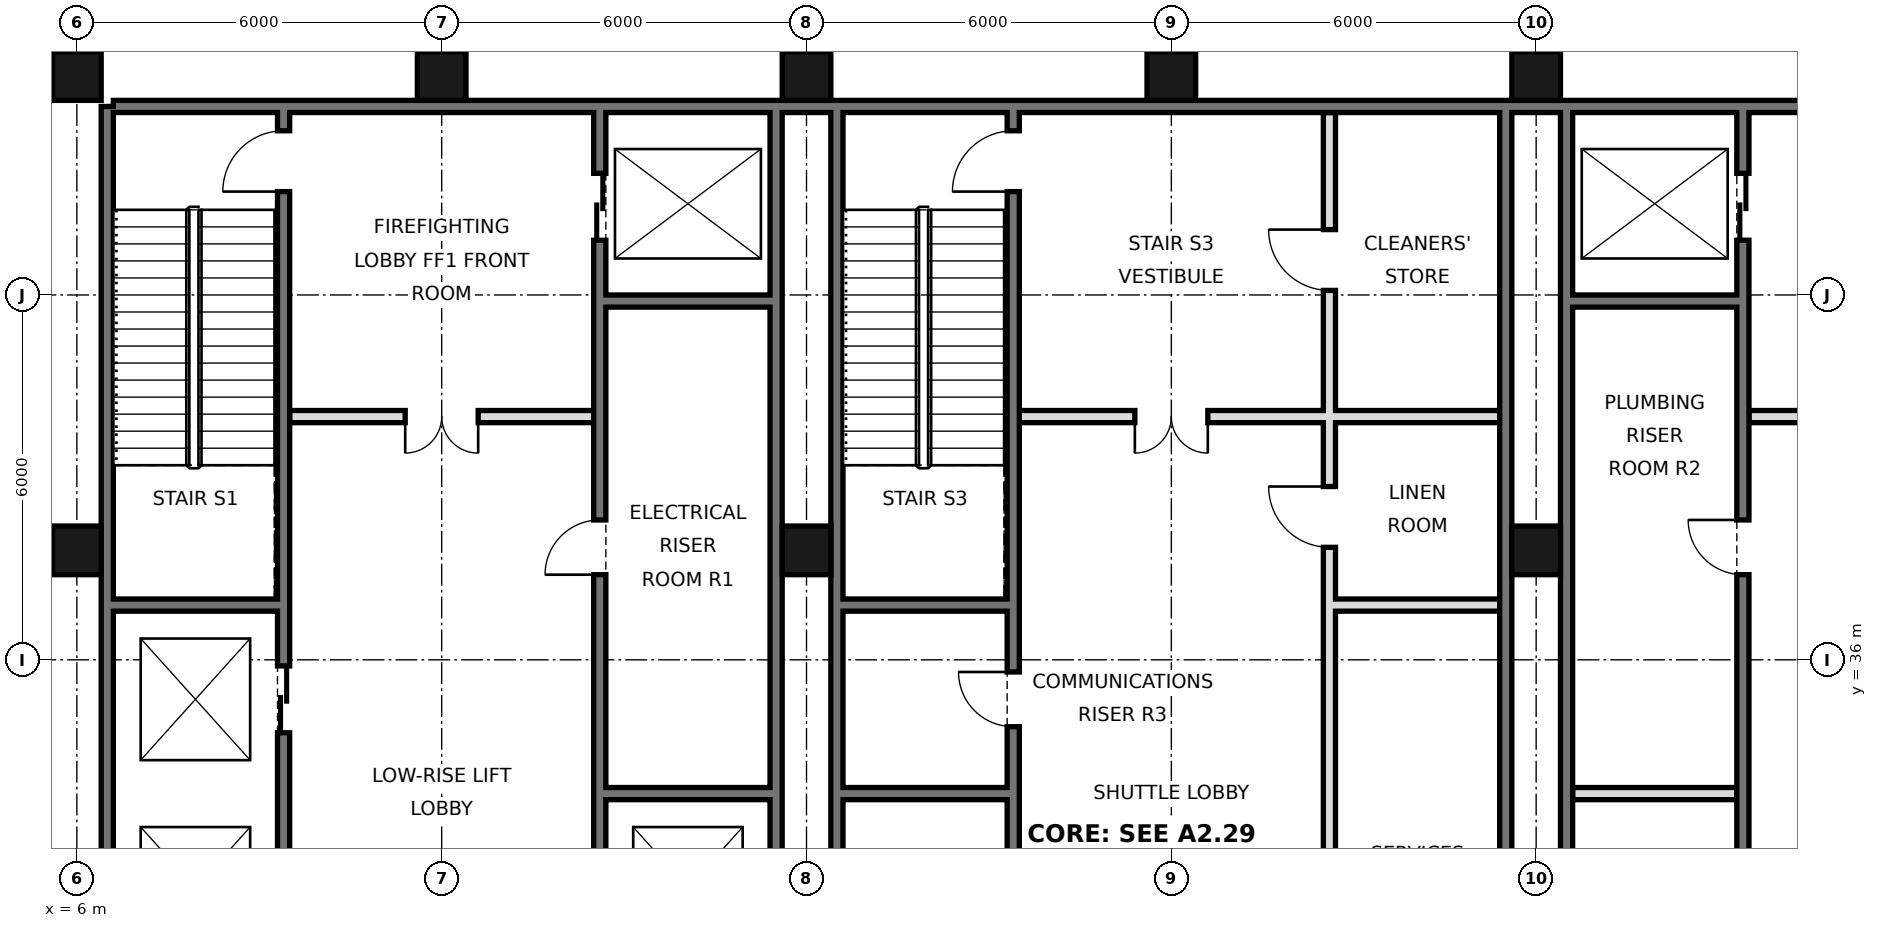
"""IFC4 building model, lengths in metres.
Left out: names, types, materials, properties, quantities, classifications, styles, units other than length and angle.
Written with IfcOpenShell. Run it as: python <this file> out.ifc"""

import sys

from ifc_helpers import new_model, si_unit, direction, frame, frame_2d, origin, origin_2d, place, context, subcontext, project, spatial, rectangle, hollow_rectangle, extrude, element, fill, save


model = new_model("IFC4")
c1 = context("Model", 3, precision=1e-05, world=origin(), true_north=direction((0.0, 1.0)))
c2 = subcontext(c1, "Body", "Model", "MODEL_VIEW")
j1 = project(units=[si_unit("LENGTHUNIT", "METRE"), si_unit("PLANEANGLEUNIT", "RADIAN")], contexts=[c1])
p1 = place(None, origin())
s1 = spatial("IfcSite", under=j1, at=p1, CompositionType="ELEMENT")
p2 = place(p1, origin())
s2 = spatial("IfcBuilding", under=s1, at=p2, CompositionType="ELEMENT")
p3 = place(p2, frame((0.0, 0.0, 114.2)))
s3 = spatial("IfcBuildingStorey", under=s2, at=p3, CompositionType="ELEMENT", Elevation=114.2)
for number, where, z_axis, x_axis in (
    (1, (6.0, 37.8, 0.0), (0.0, 0.0, 1.0), (1.0, 0.0, 0.0)),
    (2, (6.0, 45.6, 0.0), (0.0, 0.0, 1.0), (1.0, 0.0, 0.0)),
    (3, (12.0, 45.6, 0.0), (0.0, 0.0, 1.0), (1.0, 0.0, 0.0)),
    (4, (18.0, 37.8, 0.0), (0.0, 0.0, 1.0), (1.0, 0.0, 0.0)),
    (5, (18.0, 45.6, 0.0), (0.0, 0.0, 1.0), (1.0, 0.0, 0.0)),
    (6, (24.0, 45.6, 0.0), (0.0, 0.0, 1.0), (1.0, 0.0, 0.0)),
    (7, (30.0, 37.8, 0.0), (0.0, 0.0, 1.0), (1.0, 0.0, 0.0)),
    (8, (30.0, 45.6, 0.0), (0.0, 0.0, 1.0), (1.0, 0.0, 0.0)),
):
    element("IfcColumn", number, at=place(p3, frame(where, z_axis=z_axis, x_axis=x_axis)), inside=s3, PredefinedType="COLUMN", context=c2, shape_type="SweptSolid", body=[
        extrude(hollow_rectangle(XDim=0.8, YDim=0.8, WallThickness=0.05, at=origin_2d()), origin(), (0.0, 0.0, 1.0), 5.4),
    ])
p4 = place(p3, frame((6.5, 21.6, 0.0), z_axis=(0.0, 0.0, 1.0), x_axis=(0.0, 1.0, 0.0)))
e9 = element("IfcWall", 9, at=p4, inside=s3, PredefinedType="SOLIDWALL", context=c2, shape_type="SweptSolid", body=[
    extrude(rectangle(XDim=23.5, YDim=0.2, at=frame_2d((11.75, 0.0))), origin(), (0.0, 0.0, 1.0), 5.22),
])
p5 = place(p3, frame((6.6, 45.1, 0.0), z_axis=(0.0, 0.0, 1.0), x_axis=(1.0, 0.0, 0.0)))
e10 = element("IfcWall", 10, at=p5, inside=s3, PredefinedType="SOLIDWALL", context=c2, shape_type="SweptSolid", body=[
    extrude(rectangle(XDim=34.8, YDim=0.2, at=frame_2d((17.4, 0.0))), origin(), (0.0, 0.0, 1.0), 5.22),
])
for number, where, z_axis, x_axis in (
    (11, (17.5, 27.6, 0.0), (0.0, 0.0, 1.0), (0.0, 1.0, 0.0)),
    (12, (18.5, 27.6, 0.0), (0.0, 0.0, 1.0), (0.0, 1.0, 0.0)),
    (13, (29.5, 27.6, 0.0), (0.0, 0.0, 1.0), (0.0, 1.0, 0.0)),
    (14, (30.5, 27.6, 0.0), (0.0, 0.0, 1.0), (0.0, 1.0, 0.0)),
):
    element("IfcWall", number, at=place(p3, frame(where, z_axis=z_axis, x_axis=x_axis)), inside=s3, PredefinedType="SOLIDWALL", context=c2, shape_type="SweptSolid", body=[
        extrude(rectangle(XDim=17.5, YDim=0.2, at=frame_2d((8.75, 0.0))), origin(), (0.0, 0.0, 1.0), 5.22),
    ])
p6 = place(p3, frame((14.6, 27.5, 0.0), z_axis=(0.0, 0.0, 1.0), x_axis=(0.0, 1.0, 0.0)))
e15 = element("IfcWall", 15, at=p6, inside=s3, PredefinedType="SOLIDWALL", context=c2, shape_type="SweptSolid", body=[
    extrude(rectangle(XDim=17.5, YDim=0.2, at=frame_2d((8.75, 0.0))), origin(), (0.0, 0.0, 1.0), 5.22),
])
p7 = place(p6, frame((1.1, 0.0, 0.0)))
e16 = element("IfcOpeningElement", 16, at=p7, cuts=e15, PredefinedType="OPENING", context=c2, shape_type="SweptSolid", body=[
    extrude(rectangle(XDim=1.1, YDim=2.1, at=frame_2d((0.55, 1.05))), frame((0.0, 0.11, 0.0), z_axis=(0.0, -1.0, 0.0), x_axis=(1.0, 0.0, 0.0)), (0.0, 0.0, 1.0), 0.22),
])
p8 = place(p6, frame((4.2, 0.0, 0.0)))
e17 = element("IfcOpeningElement", 17, at=p8, cuts=e15, PredefinedType="OPENING", context=c2, shape_type="SweptSolid", body=[
    extrude(rectangle(XDim=1.1, YDim=2.1, at=frame_2d((0.55, 1.05))), frame((0.0, 0.11, 0.0), z_axis=(0.0, -1.0, 0.0), x_axis=(1.0, 0.0, 0.0)), (0.0, 0.0, 1.0), 0.22),
])
p9 = place(p6, frame((15.4, 0.0, 0.0)))
e18 = element("IfcOpeningElement", 18, at=p9, cuts=e15, PredefinedType="OPENING", context=c2, shape_type="SweptSolid", body=[
    extrude(rectangle(XDim=1.1, YDim=2.1, at=frame_2d((0.55, 1.05))), frame((0.0, 0.11, 0.0), z_axis=(0.0, -1.0, 0.0), x_axis=(1.0, 0.0, 0.0)), (0.0, 0.0, 1.0), 0.22),
])
p10 = place(p6, frame((9.9, 0.0, 0.0)))
e19 = element("IfcOpeningElement", 19, at=p10, cuts=e15, PredefinedType="OPENING", context=c2, shape_type="SweptSolid", body=[
    extrude(rectangle(XDim=0.9, YDim=2.1, at=frame_2d((0.45, 1.05))), frame((0.0, 0.11, 0.0), z_axis=(0.0, -1.0, 0.0), x_axis=(1.0, 0.0, 0.0)), (0.0, 0.0, 1.0), 0.22),
])
p11 = place(p3, frame((21.4, 27.5, 0.0), z_axis=(0.0, 0.0, 1.0), x_axis=(0.0, 1.0, 0.0)))
e20 = element("IfcWall", 20, at=p11, inside=s3, PredefinedType="SOLIDWALL", context=c2, shape_type="SweptSolid", body=[
    extrude(rectangle(XDim=17.5, YDim=0.2, at=frame_2d((8.75, 0.0))), origin(), (0.0, 0.0, 1.0), 5.22),
])
p12 = place(p11, frame((16.2, 0.0, 0.0)))
e21 = element("IfcOpeningElement", 21, at=p12, cuts=e20, PredefinedType="OPENING", context=c2, shape_type="SweptSolid", body=[
    extrude(rectangle(XDim=1.0, YDim=2.1, at=frame_2d((0.5, 1.05))), frame((0.0, 0.11, 0.0), z_axis=(0.0, -1.0, 0.0), x_axis=(1.0, 0.0, 0.0)), (0.0, 0.0, 1.0), 0.22),
])
p13 = place(p11, frame((7.4, 0.0, 0.0)))
e22 = element("IfcOpeningElement", 22, at=p13, cuts=e20, PredefinedType="OPENING", context=c2, shape_type="SweptSolid", body=[
    extrude(rectangle(XDim=0.9, YDim=2.1, at=frame_2d((0.45, 1.05))), frame((0.0, 0.11, 0.0), z_axis=(0.0, -1.0, 0.0), x_axis=(1.0, 0.0, 0.0)), (0.0, 0.0, 1.0), 0.22),
])
p14 = place(p3, frame((26.6, 27.5, 0.0), z_axis=(0.0, 0.0, 1.0), x_axis=(0.0, 1.0, 0.0)))
e23 = element("IfcWall", 23, at=p14, inside=s3, PredefinedType="SOLIDWALL", context=c2, shape_type="SweptSolid", body=[
    extrude(rectangle(XDim=17.5, YDim=0.2, at=frame_2d((8.75, 0.0))), origin(), (0.0, 0.0, 1.0), 5.22),
])
p15 = place(p14, frame((4.3, 0.0, 0.0)))
e24 = element("IfcOpeningElement", 24, at=p15, cuts=e23, PredefinedType="OPENING", context=c2, shape_type="SweptSolid", body=[
    extrude(rectangle(XDim=0.9, YDim=2.1, at=frame_2d((0.45, 1.05))), frame((0.0, 0.11, 0.0), z_axis=(0.0, -1.0, 0.0), x_axis=(1.0, 0.0, 0.0)), (0.0, 0.0, 1.0), 0.22),
])
p16 = place(p14, frame((10.35, 0.0, 0.0)))
e25 = element("IfcOpeningElement", 25, at=p16, cuts=e23, PredefinedType="OPENING", context=c2, shape_type="SweptSolid", body=[
    extrude(rectangle(XDim=1.0, YDim=2.1, at=frame_2d((0.5, 1.05))), frame((0.0, 0.11, 0.0), z_axis=(0.0, -1.0, 0.0), x_axis=(1.0, 0.0, 0.0)), (0.0, 0.0, 1.0), 0.22),
])
p17 = place(p14, frame((14.575, 0.0, 0.0)))
e26 = element("IfcOpeningElement", 26, at=p17, cuts=e23, PredefinedType="OPENING", context=c2, shape_type="SweptSolid", body=[
    extrude(rectangle(XDim=1.0, YDim=2.1, at=frame_2d((0.5, 1.05))), frame((0.0, 0.11, 0.0), z_axis=(0.0, -1.0, 0.0), x_axis=(1.0, 0.0, 0.0)), (0.0, 0.0, 1.0), 0.22),
])
p18 = place(p3, frame((33.4, 27.5, 0.0), z_axis=(0.0, 0.0, 1.0), x_axis=(0.0, 1.0, 0.0)))
e27 = element("IfcWall", 27, at=p18, inside=s3, PredefinedType="SOLIDWALL", context=c2, shape_type="SweptSolid", body=[
    extrude(rectangle(XDim=17.5, YDim=0.2, at=frame_2d((8.75, 0.0))), origin(), (0.0, 0.0, 1.0), 5.22),
])
p19 = place(p18, frame((15.4, 0.0, 0.0)))
e28 = element("IfcOpeningElement", 28, at=p19, cuts=e27, PredefinedType="OPENING", context=c2, shape_type="SweptSolid", body=[
    extrude(rectangle(XDim=1.1, YDim=2.1, at=frame_2d((0.55, 1.05))), frame((0.0, 0.11, 0.0), z_axis=(0.0, -1.0, 0.0), x_axis=(1.0, 0.0, 0.0)), (0.0, 0.0, 1.0), 0.22),
])
p20 = place(p18, frame((2.7, 0.0, 0.0)))
e29 = element("IfcOpeningElement", 29, at=p20, cuts=e27, PredefinedType="OPENING", context=c2, shape_type="SweptSolid", body=[
    extrude(rectangle(XDim=1.0, YDim=2.1, at=frame_2d((0.5, 1.05))), frame((0.0, 0.11, 0.0), z_axis=(0.0, -1.0, 0.0), x_axis=(1.0, 0.0, 0.0)), (0.0, 0.0, 1.0), 0.22),
])
p21 = place(p18, frame((9.9, 0.0, 0.0)))
e30 = element("IfcOpeningElement", 30, at=p21, cuts=e27, PredefinedType="OPENING", context=c2, shape_type="SweptSolid", body=[
    extrude(rectangle(XDim=0.9, YDim=2.1, at=frame_2d((0.45, 1.05))), frame((0.0, 0.11, 0.0), z_axis=(0.0, -1.0, 0.0), x_axis=(1.0, 0.0, 0.0)), (0.0, 0.0, 1.0), 0.22),
])
p22 = place(p3, frame((9.4, 21.6, 0.0), z_axis=(0.0, 0.0, 1.0), x_axis=(0.0, 1.0, 0.0)))
e31 = element("IfcWall", 31, at=p22, inside=s3, PredefinedType="SOLIDWALL", context=c2, shape_type="SweptSolid", body=[
    extrude(rectangle(XDim=23.4, YDim=0.2, at=frame_2d((11.7, 0.0))), origin(), (0.0, 0.0, 1.0), 5.22),
])
p23 = place(p22, frame((7.0, 0.0, 0.0)))
e32 = element("IfcOpeningElement", 32, at=p23, cuts=e31, PredefinedType="OPENING", context=c2, shape_type="SweptSolid", body=[
    extrude(rectangle(XDim=1.1, YDim=2.1, at=frame_2d((0.55, 1.05))), frame((0.0, 0.11, 0.0), z_axis=(0.0, -1.0, 0.0), x_axis=(1.0, 0.0, 0.0)), (0.0, 0.0, 1.0), 0.22),
])
p24 = place(p22, frame((10.1, 0.0, 0.0)))
e33 = element("IfcOpeningElement", 33, at=p24, cuts=e31, PredefinedType="OPENING", context=c2, shape_type="SweptSolid", body=[
    extrude(rectangle(XDim=1.1, YDim=2.1, at=frame_2d((0.55, 1.05))), frame((0.0, 0.11, 0.0), z_axis=(0.0, -1.0, 0.0), x_axis=(1.0, 0.0, 0.0)), (0.0, 0.0, 1.0), 0.22),
])
p25 = place(p22, frame((13.2, 0.0, 0.0)))
e34 = element("IfcOpeningElement", 34, at=p25, cuts=e31, PredefinedType="OPENING", context=c2, shape_type="SweptSolid", body=[
    extrude(rectangle(XDim=1.1, YDim=2.1, at=frame_2d((0.55, 1.05))), frame((0.0, 0.11, 0.0), z_axis=(0.0, -1.0, 0.0), x_axis=(1.0, 0.0, 0.0)), (0.0, 0.0, 1.0), 0.22),
])
p26 = place(p22, frame((22.1, 0.0, 0.0)))
e35 = element("IfcOpeningElement", 35, at=p26, cuts=e31, PredefinedType="OPENING", context=c2, shape_type="SweptSolid", body=[
    extrude(rectangle(XDim=1.0, YDim=2.1, at=frame_2d((0.5, 1.05))), frame((0.0, 0.11, 0.0), z_axis=(0.0, -1.0, 0.0), x_axis=(1.0, 0.0, 0.0)), (0.0, 0.0, 1.0), 0.22),
])
p27 = place(p22, frame((0.175, 0.0, 0.0)))
e36 = element("IfcOpeningElement", 36, at=p27, cuts=e31, PredefinedType="OPENING", context=c2, shape_type="SweptSolid", body=[
    extrude(rectangle(XDim=0.9, YDim=2.1, at=frame_2d((0.45, 1.05))), frame((0.0, 0.11, 0.0), z_axis=(0.0, -1.0, 0.0), x_axis=(1.0, 0.0, 0.0)), (0.0, 0.0, 1.0), 0.22),
])
for number, where, z_axis, x_axis in (
    (37, (14.7, 33.8, 0.0), (0.0, 0.0, 1.0), (1.0, 0.0, 0.0)),
    (38, (18.6, 33.8, 0.0), (0.0, 0.0, 1.0), (1.0, 0.0, 0.0)),
    (39, (30.6, 33.8, 0.0), (0.0, 0.0, 1.0), (1.0, 0.0, 0.0)),
    (40, (18.6, 36.9, 0.0), (0.0, 0.0, 1.0), (1.0, 0.0, 0.0)),
    (41, (26.7, 36.9, 0.0), (0.0, 0.0, 1.0), (1.0, 0.0, 0.0)),
    (42, (6.6, 36.9, 0.0), (0.0, 0.0, 1.0), (1.0, 0.0, 0.0)),
):
    element("IfcWall", number, at=place(p3, frame(where, z_axis=z_axis, x_axis=x_axis)), inside=s3, PredefinedType="SOLIDWALL", context=c2, shape_type="SweptSolid", body=[
        extrude(rectangle(XDim=2.7, YDim=0.2, at=frame_2d((1.35, 0.0))), origin(), (0.0, 0.0, 1.0), 5.22),
    ])
p28 = place(p3, frame((21.5, 40.0, 0.0), z_axis=(0.0, 0.0, 1.0), x_axis=(1.0, 0.0, 0.0)))
e43 = element("IfcWall", 43, at=p28, inside=s3, PredefinedType="PARTITIONING", context=c2, shape_type="SweptSolid", body=[
    extrude(rectangle(XDim=7.9, YDim=0.2, at=frame_2d((3.95, 0.0))), origin(), (0.0, 0.0, 1.0), 5.22),
])
p29 = place(p28, frame((1.9, 0.0, 0.0)))
e44 = element("IfcOpeningElement", 44, at=p29, cuts=e43, PredefinedType="OPENING", context=c2, shape_type="SweptSolid", body=[
    extrude(rectangle(XDim=1.2, YDim=2.1, at=frame_2d((0.6, 1.05))), frame((0.0, 0.11, 0.0), z_axis=(0.0, -1.0, 0.0), x_axis=(1.0, 0.0, 0.0)), (0.0, 0.0, 1.0), 0.22),
])
p30 = place(p3, frame((33.5, 40.0, 0.0), z_axis=(0.0, 0.0, 1.0), x_axis=(1.0, 0.0, 0.0)))
e45 = element("IfcWall", 45, at=p30, inside=s3, PredefinedType="PARTITIONING", context=c2, shape_type="SweptSolid", body=[
    extrude(rectangle(XDim=5.0, YDim=0.2, at=frame_2d((2.5, 0.0))), origin(), (0.0, 0.0, 1.0), 5.22),
])
p31 = place(p30, frame((1.9, 0.0, 0.0)))
e46 = element("IfcOpeningElement", 46, at=p31, cuts=e45, PredefinedType="OPENING", context=c2, shape_type="SweptSolid", body=[
    extrude(rectangle(XDim=1.2, YDim=2.1, at=frame_2d((0.6, 1.05))), frame((0.0, 0.11, 0.0), z_axis=(0.0, -1.0, 0.0), x_axis=(1.0, 0.0, 0.0)), (0.0, 0.0, 1.0), 0.22),
])
p32 = place(p3, frame((9.5, 40.0, 0.0), z_axis=(0.0, 0.0, 1.0), x_axis=(1.0, 0.0, 0.0)))
e47 = element("IfcWall", 47, at=p32, inside=s3, PredefinedType="PARTITIONING", context=c2, shape_type="SweptSolid", body=[
    extrude(rectangle(XDim=5.0, YDim=0.2, at=frame_2d((2.5, 0.0))), origin(), (0.0, 0.0, 1.0), 5.22),
])
p33 = place(p32, frame((1.9, 0.0, 0.0)))
e48 = element("IfcOpeningElement", 48, at=p33, cuts=e47, PredefinedType="OPENING", context=c2, shape_type="SweptSolid", body=[
    extrude(rectangle(XDim=1.2, YDim=2.1, at=frame_2d((0.6, 1.05))), frame((0.0, 0.11, 0.0), z_axis=(0.0, -1.0, 0.0), x_axis=(1.0, 0.0, 0.0)), (0.0, 0.0, 1.0), 0.22),
])
for number, where, z_axis, x_axis in (
    (49, (14.7, 41.9, 0.0), (0.0, 0.0, 1.0), (1.0, 0.0, 0.0)),
    (50, (30.6, 41.9, 0.0), (0.0, 0.0, 1.0), (1.0, 0.0, 0.0)),
):
    element("IfcWall", number, at=place(p3, frame(where, z_axis=z_axis, x_axis=x_axis)), inside=s3, PredefinedType="SOLIDWALL", context=c2, shape_type="SweptSolid", body=[
        extrude(rectangle(XDim=2.7, YDim=0.2, at=frame_2d((1.35, 0.0))), origin(), (0.0, 0.0, 1.0), 5.22),
    ])
p34 = place(p33, frame((1.2, 0.0, 0.0), z_axis=(0.0, 0.0, 1.0), x_axis=(-1.0, 0.0, 0.0)))
e51 = element("IfcDoor", 51, at=p34, inside=s3, OperationType="DOUBLE_DOOR_SINGLE_SWING", PredefinedType="DOOR", context=c2, shape_type="SweptSolid", body=[
    extrude(rectangle(XDim=1.2, YDim=2.1, at=frame_2d((0.6, 1.05))), frame((0.0, 0.025, 0.0), z_axis=(0.0, -1.0, 0.0), x_axis=(1.0, 0.0, 0.0)), (0.0, 0.0, 1.0), 0.05),
])
fill(e48, e51)
p35 = place(p29, frame((1.2, 0.0, 0.0), z_axis=(0.0, 0.0, 1.0), x_axis=(-1.0, 0.0, 0.0)))
e52 = element("IfcDoor", 52, at=p35, inside=s3, OperationType="DOUBLE_DOOR_SINGLE_SWING", PredefinedType="DOOR", context=c2, shape_type="SweptSolid", body=[
    extrude(rectangle(XDim=1.2, YDim=2.1, at=frame_2d((0.6, 1.05))), frame((0.0, 0.025, 0.0), z_axis=(0.0, -1.0, 0.0), x_axis=(1.0, 0.0, 0.0)), (0.0, 0.0, 1.0), 0.05),
])
fill(e44, e52)
p36 = place(p19, origin())
e53 = element("IfcDoor", 53, at=p36, inside=s3, OperationType="DOUBLE_DOOR_SLIDING", PredefinedType="DOOR", context=c2, shape_type="SweptSolid", body=[
    extrude(rectangle(XDim=1.1, YDim=2.1, at=frame_2d((0.55, 1.05))), frame((0.0, 0.025, 0.0), z_axis=(0.0, -1.0, 0.0), x_axis=(1.0, 0.0, 0.0)), (0.0, 0.0, 1.0), 0.05),
])
fill(e28, e53)
p37 = place(p9, origin())
e54 = element("IfcDoor", 54, at=p37, inside=s3, OperationType="DOUBLE_DOOR_SLIDING", PredefinedType="DOOR", context=c2, shape_type="SweptSolid", body=[
    extrude(rectangle(XDim=1.1, YDim=2.1, at=frame_2d((0.55, 1.05))), frame((0.0, 0.025, 0.0), z_axis=(0.0, -1.0, 0.0), x_axis=(1.0, 0.0, 0.0)), (0.0, 0.0, 1.0), 0.05),
])
fill(e18, e54)
p38 = place(p25, origin())
e55 = element("IfcDoor", 55, at=p38, inside=s3, OperationType="DOUBLE_DOOR_SLIDING", PredefinedType="DOOR", context=c2, shape_type="SweptSolid", body=[
    extrude(rectangle(XDim=1.1, YDim=2.1, at=frame_2d((0.55, 1.05))), frame((0.0, 0.025, 0.0), z_axis=(0.0, -1.0, 0.0), x_axis=(1.0, 0.0, 0.0)), (0.0, 0.0, 1.0), 0.05),
])
fill(e34, e55)
p39 = place(p26, origin())
e56 = element("IfcDoor", 56, at=p39, inside=s3, OperationType="SINGLE_SWING_LEFT", PredefinedType="DOOR", context=c2, shape_type="SweptSolid", body=[
    extrude(rectangle(XDim=1.0, YDim=2.1, at=frame_2d((0.5, 1.05))), frame((0.0, 0.025, 0.0), z_axis=(0.0, -1.0, 0.0), x_axis=(1.0, 0.0, 0.0)), (0.0, 0.0, 1.0), 0.05),
])
fill(e35, e56)
p40 = place(p12, origin())
e57 = element("IfcDoor", 57, at=p40, inside=s3, OperationType="SINGLE_SWING_LEFT", PredefinedType="DOOR", context=c2, shape_type="SweptSolid", body=[
    extrude(rectangle(XDim=1.0, YDim=2.1, at=frame_2d((0.5, 1.05))), frame((0.0, 0.025, 0.0), z_axis=(0.0, -1.0, 0.0), x_axis=(1.0, 0.0, 0.0)), (0.0, 0.0, 1.0), 0.05),
])
fill(e21, e57)
p41 = place(p10, origin())
e58 = element("IfcDoor", 58, at=p41, inside=s3, OperationType="SINGLE_SWING_LEFT", PredefinedType="DOOR", context=c2, shape_type="SweptSolid", body=[
    extrude(rectangle(XDim=0.9, YDim=2.1, at=frame_2d((0.45, 1.05))), frame((0.0, 0.025, 0.0), z_axis=(0.0, -1.0, 0.0), x_axis=(1.0, 0.0, 0.0)), (0.0, 0.0, 1.0), 0.05),
])
fill(e19, e58)
p42 = place(p21, frame((0.9, 0.0, 0.0), z_axis=(0.0, 0.0, 1.0), x_axis=(-1.0, 0.0, 0.0)))
e59 = element("IfcDoor", 59, at=p42, inside=s3, OperationType="SINGLE_SWING_LEFT", PredefinedType="DOOR", context=c2, shape_type="SweptSolid", body=[
    extrude(rectangle(XDim=0.9, YDim=2.1, at=frame_2d((0.45, 1.05))), frame((0.0, 0.025, 0.0), z_axis=(0.0, -1.0, 0.0), x_axis=(1.0, 0.0, 0.0)), (0.0, 0.0, 1.0), 0.05),
])
fill(e30, e59)
p43 = place(p13, frame((0.9, 0.0, 0.0), z_axis=(0.0, 0.0, 1.0), x_axis=(-1.0, 0.0, 0.0)))
e60 = element("IfcDoor", 60, at=p43, inside=s3, OperationType="SINGLE_SWING_LEFT", PredefinedType="DOOR", context=c2, shape_type="SweptSolid", body=[
    extrude(rectangle(XDim=0.9, YDim=2.1, at=frame_2d((0.45, 1.05))), frame((0.0, 0.025, 0.0), z_axis=(0.0, -1.0, 0.0), x_axis=(1.0, 0.0, 0.0)), (0.0, 0.0, 1.0), 0.05),
])
fill(e22, e60)
p44 = place(p16, frame((1.0, 0.0, 0.0), z_axis=(0.0, 0.0, 1.0), x_axis=(-1.0, 0.0, 0.0)))
e61 = element("IfcDoor", 61, at=p44, inside=s3, OperationType="SINGLE_SWING_LEFT", PredefinedType="DOOR", context=c2, shape_type="SweptSolid", body=[
    extrude(rectangle(XDim=1.0, YDim=2.1, at=frame_2d((0.5, 1.05))), frame((0.0, 0.025, 0.0), z_axis=(0.0, -1.0, 0.0), x_axis=(1.0, 0.0, 0.0)), (0.0, 0.0, 1.0), 0.05),
])
fill(e25, e61)
p45 = place(p17, frame((1.0, 0.0, 0.0), z_axis=(0.0, 0.0, 1.0), x_axis=(-1.0, 0.0, 0.0)))
e62 = element("IfcDoor", 62, at=p45, inside=s3, OperationType="SINGLE_SWING_LEFT", PredefinedType="DOOR", context=c2, shape_type="SweptSolid", body=[
    extrude(rectangle(XDim=1.0, YDim=2.1, at=frame_2d((0.5, 1.05))), frame((0.0, 0.025, 0.0), z_axis=(0.0, -1.0, 0.0), x_axis=(1.0, 0.0, 0.0)), (0.0, 0.0, 1.0), 0.05),
])
fill(e26, e62)
save(model, sys.argv[1])
